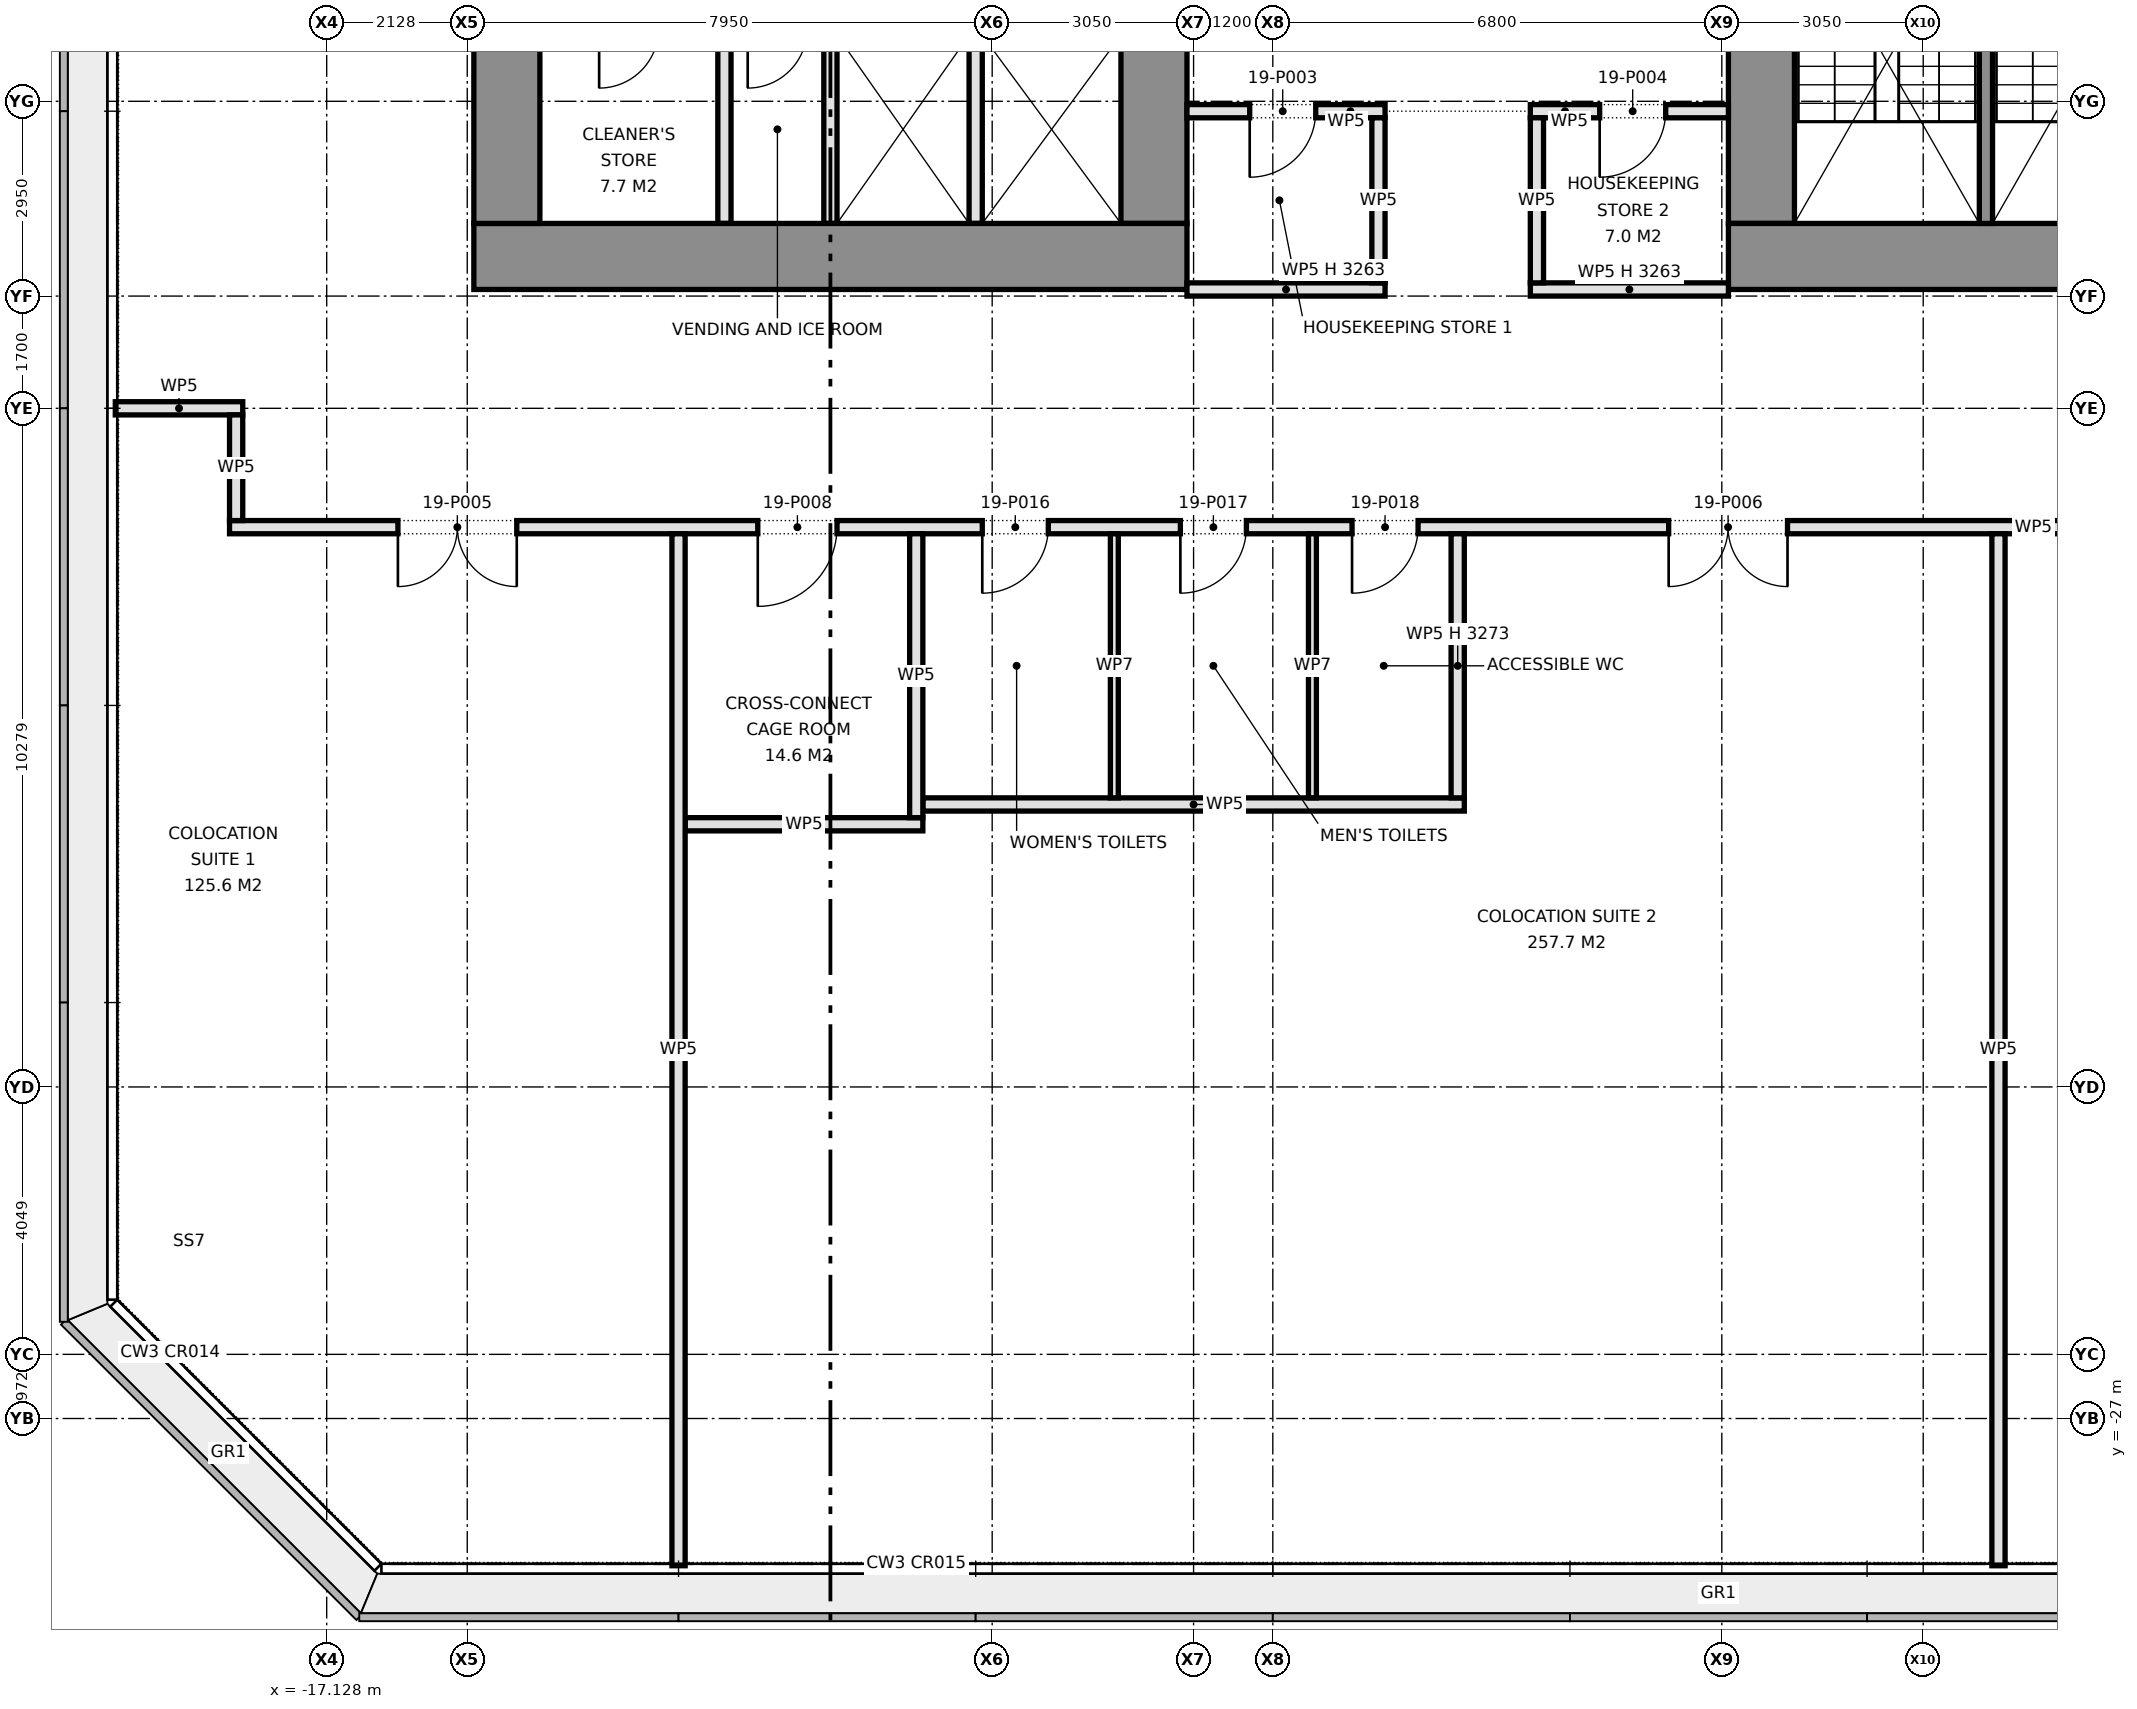
"""IFC4 building model, lengths in metres.
Left out: names, types, materials, properties, quantities, classifications, styles, units other than length and angle.
Written with IfcOpenShell. Run it as: python <this file> out.ifc"""

import sys

from ifc_helpers import new_model, si_unit, direction, frame, frame_2d, origin, place, context, subcontext, project, spatial, rectangle, extrude, element, fill, save


model = new_model("IFC4")
c1 = context("Model", 3, precision=1e-05, world=origin(), true_north=direction((0.0, 1.0)))
c2 = subcontext(c1, "Body", "Model", "MODEL_VIEW")
j1 = project(units=[si_unit("LENGTHUNIT", "METRE"), si_unit("PLANEANGLEUNIT", "RADIAN")], contexts=[c1])
p1 = place(None, origin())
s1 = spatial("IfcSite", under=j1, at=p1, CompositionType="ELEMENT")
p2 = place(p1, origin())
s2 = spatial("IfcBuilding", under=s1, at=p2, CompositionType="ELEMENT")
p3 = place(p2, frame((0.0, 0.0, 86.4)))
s3 = spatial("IfcBuildingStorey", under=s2, at=p3, CompositionType="ELEMENT", Elevation=86.4)
p4 = place(p3, frame((-14.9, -9.4, 0.0), z_axis=(0.0, 0.0, 1.0), x_axis=(1.0, 0.0, 0.0)))
e1 = element("IfcWall", 1, at=p4, inside=s3, PredefinedType="SHEAR", context=c2, shape_type="SweptSolid", body=[
    extrude(rectangle(XDim=10.8, YDim=1.0, at=frame_2d((5.4, 0.0))), origin(), (0.0, 0.0, 1.0), 4.2),
])
for number, where, z_axis, x_axis in (
    (2, (-14.4, -8.9, 0.0), (0.0, 0.0, 1.0), (0.0, 1.0, 0.0)),
    (3, (-4.6, -8.9, 0.0), (0.0, 0.0, 1.0), (0.0, 1.0, 0.0)),
):
    element("IfcWall", number, at=place(p3, frame(where, z_axis=z_axis, x_axis=x_axis)), inside=s3, PredefinedType="SHEAR", context=c2, shape_type="SweptSolid", body=[
        extrude(rectangle(XDim=3.15, YDim=1.0, at=frame_2d((1.575, 0.0))), origin(), (0.0, 0.0, 1.0), 4.2),
    ])
for number, where, z_axis, x_axis in (
    (4, (-9.5, -8.9, 0.0), (0.0, 0.0, 1.0), (0.0, 1.0, 0.0)),
    (5, (-7.3, -8.9, 0.0), (0.0, 0.0, 1.0), (0.0, 1.0, 0.0)),
    (6, (-11.105, -8.9, 0.0), (0.0, 0.0, 1.0), (0.0, 1.0, 0.0)),
):
    element("IfcWall", number, at=place(p3, frame(where, z_axis=z_axis, x_axis=x_axis)), inside=s3, PredefinedType="PARTITIONING", context=c2, shape_type="SweptSolid", body=[
        extrude(rectangle(XDim=2.85, YDim=0.2, at=frame_2d((1.425, 0.0))), origin(), (0.0, 0.0, 1.0), 4.2),
    ])
p5 = place(p3, frame((14.9, -9.4, 0.0), z_axis=(0.0, 0.0, 1.0), x_axis=(-1.0, 0.0, 0.0)))
e7 = element("IfcWall", 7, at=p5, inside=s3, PredefinedType="SHEAR", context=c2, shape_type="SweptSolid", body=[
    extrude(rectangle(XDim=10.8, YDim=1.0, at=frame_2d((5.4, 0.0))), origin(), (0.0, 0.0, 1.0), 4.2),
])
p6 = place(p3, frame((4.6, -1.55, 0.0), z_axis=(0.0, 0.0, 1.0), x_axis=(0.0, -1.0, 0.0)))
e8 = element("IfcWall", 8, at=p6, inside=s3, PredefinedType="SHEAR", context=c2, shape_type="SweptSolid", body=[
    extrude(rectangle(XDim=7.35, YDim=1.0, at=frame_2d((3.675, 0.0))), origin(), (0.0, 0.0, 1.0), 4.2),
])
p7 = place(p3, frame((8.0, -2.38, 0.0), z_axis=(0.0, 0.0, 1.0), x_axis=(0.0, -1.0, 0.0)))
e9 = element("IfcWall", 9, at=p7, inside=s3, PredefinedType="SHEAR", context=c2, shape_type="SweptSolid", body=[
    extrude(rectangle(XDim=6.52, YDim=0.2, at=frame_2d((3.26, 0.0))), origin(), (0.0, 0.0, 1.0), 4.2),
])
p8 = place(p3, frame((-11.7, -18.0, 0.0), z_axis=(0.0, 0.0, 1.0), x_axis=(1.0, 0.0, 0.0)))
e10 = element("IfcWall", 10, at=p8, inside=s3, PredefinedType="PARTITIONING", context=c2, shape_type="SweptSolid", body=[
    extrude(rectangle(XDim=3.6, YDim=0.2, at=frame_2d((1.8, 0.0))), origin(), (0.0, 0.0, 1.0), 4.2),
])
p9 = place(p3, frame((-8.1, -17.7, 0.0), z_axis=(0.0, 0.0, 1.0), x_axis=(1.0, 0.0, 0.0)))
e11 = element("IfcWall", 11, at=p9, inside=s3, PredefinedType="PARTITIONING", context=c2, shape_type="SweptSolid", body=[
    extrude(rectangle(XDim=8.2, YDim=0.2, at=frame_2d((4.1, 0.0))), origin(), (0.0, 0.0, 1.0), 4.2),
])
p10 = place(p3, frame((-18.6, -13.5, 0.0), z_axis=(0.0, 0.0, 1.0), x_axis=(1.0, 0.0, 0.0)))
e12 = element("IfcWall", 12, at=p10, inside=s3, PredefinedType="PARTITIONING", context=c2, shape_type="SweptSolid", body=[
    extrude(rectangle(XDim=37.2, YDim=0.2, at=frame_2d((18.6, 0.0))), origin(), (0.0, 0.0, 1.0), 4.2),
])
p11 = place(p10, frame((2.55, 0.0, 0.0)))
e13 = element("IfcOpeningElement", 13, at=p11, cuts=e12, PredefinedType="OPENING", context=c2, shape_type="SweptSolid", body=[
    extrude(rectangle(XDim=1.8, YDim=2.1, at=frame_2d((0.9, 1.05))), frame((0.0, 0.11, 0.0), z_axis=(0.0, -1.0, 0.0), x_axis=(1.0, 0.0, 0.0)), (0.0, 0.0, 1.0), 0.22),
])
p12 = place(p10, frame((21.795, 0.0, 0.0)))
e14 = element("IfcOpeningElement", 14, at=p12, cuts=e12, PredefinedType="OPENING", context=c2, shape_type="SweptSolid", body=[
    extrude(rectangle(XDim=1.8, YDim=2.1, at=frame_2d((0.9, 1.05))), frame((0.0, 0.11, 0.0), z_axis=(0.0, -1.0, 0.0), x_axis=(1.0, 0.0, 0.0)), (0.0, 0.0, 1.0), 0.22),
])
p13 = place(p10, frame((31.045, 0.0, 0.0)))
e15 = element("IfcOpeningElement", 15, at=p13, cuts=e12, PredefinedType="OPENING", context=c2, shape_type="SweptSolid", body=[
    extrude(rectangle(XDim=1.8, YDim=2.1, at=frame_2d((0.9, 1.05))), frame((0.0, 0.11, 0.0), z_axis=(0.0, -1.0, 0.0), x_axis=(1.0, 0.0, 0.0)), (0.0, 0.0, 1.0), 0.22),
])
p14 = place(p10, frame((8.0, 0.0, 0.0)))
e16 = element("IfcOpeningElement", 16, at=p14, cuts=e12, PredefinedType="OPENING", context=c2, shape_type="SweptSolid", body=[
    extrude(rectangle(XDim=1.2, YDim=2.1, at=frame_2d((0.6, 1.05))), frame((0.0, 0.11, 0.0), z_axis=(0.0, -1.0, 0.0), x_axis=(1.0, 0.0, 0.0)), (0.0, 0.0, 1.0), 0.22),
])
p15 = place(p10, frame((11.4, 0.0, 0.0)))
e17 = element("IfcOpeningElement", 17, at=p15, cuts=e12, PredefinedType="OPENING", context=c2, shape_type="SweptSolid", body=[
    extrude(rectangle(XDim=1.0, YDim=2.1, at=frame_2d((0.5, 1.05))), frame((0.0, 0.11, 0.0), z_axis=(0.0, -1.0, 0.0), x_axis=(1.0, 0.0, 0.0)), (0.0, 0.0, 1.0), 0.22),
])
p16 = place(p10, frame((14.4, 0.0, 0.0)))
e18 = element("IfcOpeningElement", 18, at=p16, cuts=e12, PredefinedType="OPENING", context=c2, shape_type="SweptSolid", body=[
    extrude(rectangle(XDim=1.0, YDim=2.1, at=frame_2d((0.5, 1.05))), frame((0.0, 0.11, 0.0), z_axis=(0.0, -1.0, 0.0), x_axis=(1.0, 0.0, 0.0)), (0.0, 0.0, 1.0), 0.22),
])
p17 = place(p10, frame((17.0, 0.0, 0.0)))
e19 = element("IfcOpeningElement", 19, at=p17, cuts=e12, PredefinedType="OPENING", context=c2, shape_type="SweptSolid", body=[
    extrude(rectangle(XDim=1.0, YDim=2.1, at=frame_2d((0.5, 1.05))), frame((0.0, 0.11, 0.0), z_axis=(0.0, -1.0, 0.0), x_axis=(1.0, 0.0, 0.0)), (0.0, 0.0, 1.0), 0.22),
])
p18 = place(p3, frame((-20.33, -11.7, 0.0), z_axis=(0.0, 0.0, 1.0), x_axis=(1.0, 0.0, 0.0)))
e20 = element("IfcWall", 20, at=p18, inside=s3, PredefinedType="PARTITIONING", context=c2, shape_type="SweptSolid", body=[
    extrude(rectangle(XDim=1.93, YDim=0.2, at=frame_2d((0.965, 0.0))), origin(), (0.0, 0.0, 1.0), 4.2),
])
for number, where, z_axis, x_axis in (
    (21, (-4.1, -9.9, 0.0), (0.0, 0.0, 1.0), (1.0, 0.0, 0.0)),
    (22, (1.1, -9.9, 0.0), (0.0, 0.0, 1.0), (1.0, 0.0, 0.0)),
):
    element("IfcWall", number, at=place(p3, frame(where, z_axis=z_axis, x_axis=x_axis)), inside=s3, PredefinedType="PARTITIONING", context=c2, shape_type="SweptSolid", body=[
        extrude(rectangle(XDim=3.0, YDim=0.2, at=frame_2d((1.5, 0.0))), origin(), (0.0, 0.0, 1.0), 3.263),
    ])
p19 = place(p3, frame((-4.1, -7.2, 0.0), z_axis=(0.0, 0.0, 1.0), x_axis=(1.0, 0.0, 0.0)))
e23 = element("IfcWall", 23, at=p19, inside=s3, PredefinedType="PARTITIONING", context=c2, shape_type="SweptSolid", body=[
    extrude(rectangle(XDim=3.0, YDim=0.2, at=frame_2d((1.5, 0.0))), origin(), (0.0, 0.0, 1.0), 4.2),
])
p20 = place(p19, frame((0.95, 0.0, 0.0)))
e24 = element("IfcOpeningElement", 24, at=p20, cuts=e23, PredefinedType="OPENING", context=c2, shape_type="SweptSolid", body=[
    extrude(rectangle(XDim=1.0, YDim=2.1, at=frame_2d((0.5, 1.05))), frame((0.0, 0.11, 0.0), z_axis=(0.0, -1.0, 0.0), x_axis=(1.0, 0.0, 0.0)), (0.0, 0.0, 1.0), 0.22),
])
p21 = place(p3, frame((1.1, -7.2, 0.0), z_axis=(0.0, 0.0, 1.0), x_axis=(1.0, 0.0, 0.0)))
e25 = element("IfcWall", 25, at=p21, inside=s3, PredefinedType="PARTITIONING", context=c2, shape_type="SweptSolid", body=[
    extrude(rectangle(XDim=3.0, YDim=0.2, at=frame_2d((1.5, 0.0))), origin(), (0.0, 0.0, 1.0), 4.2),
])
p22 = place(p21, frame((1.05, 0.0, 0.0)))
e26 = element("IfcOpeningElement", 26, at=p22, cuts=e25, PredefinedType="OPENING", context=c2, shape_type="SweptSolid", body=[
    extrude(rectangle(XDim=1.0, YDim=2.1, at=frame_2d((0.5, 1.05))), frame((0.0, 0.11, 0.0), z_axis=(0.0, -1.0, 0.0), x_axis=(1.0, 0.0, 0.0)), (0.0, 0.0, 1.0), 0.22),
])
p23 = place(p3, frame((8.19, -29.23, 0.0), z_axis=(0.0, 0.0, 1.0), x_axis=(0.0, 1.0, 0.0)))
e27 = element("IfcWall", 27, at=p23, inside=s3, PredefinedType="PARTITIONING", context=c2, shape_type="SweptSolid", body=[
    extrude(rectangle(XDim=15.63, YDim=0.2, at=frame_2d((7.815, 0.0))), origin(), (0.0, 0.0, 1.0), 4.2),
])
p24 = place(p3, frame((1.2, -9.8, 0.0), z_axis=(0.0, 0.0, 1.0), x_axis=(0.0, 1.0, 0.0)))
e28 = element("IfcWall", 28, at=p24, inside=s3, PredefinedType="PARTITIONING", context=c2, shape_type="SweptSolid", body=[
    extrude(rectangle(XDim=2.5, YDim=0.2, at=frame_2d((1.25, 0.0))), origin(), (0.0, 0.0, 1.0), 4.2),
])
p25 = place(p3, frame((0.0, -17.6, 0.0), z_axis=(0.0, 0.0, 1.0), x_axis=(0.0, 1.0, 0.0)))
e29 = element("IfcWall", 29, at=p25, inside=s3, PredefinedType="PARTITIONING", context=c2, shape_type="SweptSolid", body=[
    extrude(rectangle(XDim=4.0, YDim=0.2, at=frame_2d((2.0, 0.0))), origin(), (0.0, 0.0, 1.0), 3.273),
])
p26 = place(p3, frame((-1.2, -9.8, 0.0), z_axis=(0.0, 0.0, 1.0), x_axis=(0.0, 1.0, 0.0)))
e30 = element("IfcWall", 30, at=p26, inside=s3, PredefinedType="PARTITIONING", context=c2, shape_type="SweptSolid", body=[
    extrude(rectangle(XDim=2.5, YDim=0.2, at=frame_2d((1.25, 0.0))), origin(), (0.0, 0.0, 1.0), 4.2),
])
p27 = place(p3, frame((-8.2, -17.9, 0.0), z_axis=(0.0, 0.0, 1.0), x_axis=(0.0, 1.0, 0.0)))
e31 = element("IfcWall", 31, at=p27, inside=s3, PredefinedType="PARTITIONING", context=c2, shape_type="SweptSolid", body=[
    extrude(rectangle(XDim=4.3, YDim=0.2, at=frame_2d((2.15, 0.0))), origin(), (0.0, 0.0, 1.0), 4.2),
])
p28 = place(p3, frame((-11.8, -29.23, 0.0), z_axis=(0.0, 0.0, 1.0), x_axis=(0.0, 1.0, 0.0)))
e32 = element("IfcWall", 32, at=p28, inside=s3, PredefinedType="PARTITIONING", context=c2, shape_type="SweptSolid", body=[
    extrude(rectangle(XDim=15.63, YDim=0.2, at=frame_2d((7.815, 0.0))), origin(), (0.0, 0.0, 1.0), 4.2),
])
p29 = place(p3, frame((-18.5, -13.4, 0.0), z_axis=(0.0, 0.0, 1.0), x_axis=(0.0, 1.0, 0.0)))
e33 = element("IfcWall", 33, at=p29, inside=s3, PredefinedType="PARTITIONING", context=c2, shape_type="SweptSolid", body=[
    extrude(rectangle(XDim=1.6, YDim=0.2, at=frame_2d((0.8, 0.0))), origin(), (0.0, 0.0, 1.0), 4.2),
])
for number, where, z_axis, x_axis in (
    (34, (-2.2, -17.6, 0.0), (0.0, 0.0, 1.0), (0.0, 1.0, 0.0)),
    (35, (-5.2, -17.6, 0.0), (0.0, 0.0, 1.0), (0.0, 1.0, 0.0)),
):
    element("IfcWall", number, at=place(p3, frame(where, z_axis=z_axis, x_axis=x_axis)), inside=s3, PredefinedType="PARTITIONING", context=c2, shape_type="SweptSolid", body=[
        extrude(rectangle(XDim=4.0, YDim=0.12, at=frame_2d((2.0, 0.0))), origin(), (0.0, 0.0, 1.0), 4.2),
    ])
p30 = place(p20, frame((1.0, 0.0, 0.0), z_axis=(0.0, 0.0, 1.0), x_axis=(-1.0, 0.0, 0.0)))
e36 = element("IfcDoor", 36, at=p30, inside=s3, OperationType="SINGLE_SWING_RIGHT", PredefinedType="DOOR", context=c2, shape_type="SweptSolid", body=[
    extrude(rectangle(XDim=1.0, YDim=2.1, at=frame_2d((0.5, 1.05))), frame((0.0, 0.025, 0.0), z_axis=(0.0, -1.0, 0.0), x_axis=(1.0, 0.0, 0.0)), (0.0, 0.0, 1.0), 0.05),
])
fill(e24, e36)
p31 = place(p22, frame((1.0, 0.0, 0.0), z_axis=(0.0, 0.0, 1.0), x_axis=(-1.0, 0.0, 0.0)))
e37 = element("IfcDoor", 37, at=p31, inside=s3, OperationType="SINGLE_SWING_RIGHT", PredefinedType="DOOR", context=c2, shape_type="SweptSolid", body=[
    extrude(rectangle(XDim=1.0, YDim=2.1, at=frame_2d((0.5, 1.05))), frame((0.0, 0.025, 0.0), z_axis=(0.0, -1.0, 0.0), x_axis=(1.0, 0.0, 0.0)), (0.0, 0.0, 1.0), 0.05),
])
fill(e26, e37)
p32 = place(p11, frame((1.8, 0.0, 0.0), z_axis=(0.0, 0.0, 1.0), x_axis=(-1.0, 0.0, 0.0)))
e38 = element("IfcDoor", 38, at=p32, inside=s3, OperationType="DOUBLE_DOOR_SINGLE_SWING", PredefinedType="DOOR", context=c2, shape_type="SweptSolid", body=[
    extrude(rectangle(XDim=1.8, YDim=2.1, at=frame_2d((0.9, 1.05))), frame((0.0, 0.025, 0.0), z_axis=(0.0, -1.0, 0.0), x_axis=(1.0, 0.0, 0.0)), (0.0, 0.0, 1.0), 0.05),
])
fill(e13, e38)
p33 = place(p12, frame((1.8, 0.0, 0.0), z_axis=(0.0, 0.0, 1.0), x_axis=(-1.0, 0.0, 0.0)))
e39 = element("IfcDoor", 39, at=p33, inside=s3, OperationType="DOUBLE_DOOR_SINGLE_SWING", PredefinedType="DOOR", context=c2, shape_type="SweptSolid", body=[
    extrude(rectangle(XDim=1.8, YDim=2.1, at=frame_2d((0.9, 1.05))), frame((0.0, 0.025, 0.0), z_axis=(0.0, -1.0, 0.0), x_axis=(1.0, 0.0, 0.0)), (0.0, 0.0, 1.0), 0.05),
])
fill(e14, e39)
p34 = place(p14, frame((1.2, 0.0, 0.0), z_axis=(0.0, 0.0, 1.0), x_axis=(-1.0, 0.0, 0.0)))
e40 = element("IfcDoor", 40, at=p34, inside=s3, OperationType="SINGLE_SWING_RIGHT", PredefinedType="DOOR", context=c2, shape_type="SweptSolid", body=[
    extrude(rectangle(XDim=1.2, YDim=2.1, at=frame_2d((0.6, 1.05))), frame((0.0, 0.025, 0.0), z_axis=(0.0, -1.0, 0.0), x_axis=(1.0, 0.0, 0.0)), (0.0, 0.0, 1.0), 0.05),
])
fill(e16, e40)
p35 = place(p15, frame((1.0, 0.0, 0.0), z_axis=(0.0, 0.0, 1.0), x_axis=(-1.0, 0.0, 0.0)))
e41 = element("IfcDoor", 41, at=p35, inside=s3, OperationType="SINGLE_SWING_RIGHT", PredefinedType="DOOR", context=c2, shape_type="SweptSolid", body=[
    extrude(rectangle(XDim=1.0, YDim=2.1, at=frame_2d((0.5, 1.05))), frame((0.0, 0.025, 0.0), z_axis=(0.0, -1.0, 0.0), x_axis=(1.0, 0.0, 0.0)), (0.0, 0.0, 1.0), 0.05),
])
fill(e17, e41)
p36 = place(p16, frame((1.0, 0.0, 0.0), z_axis=(0.0, 0.0, 1.0), x_axis=(-1.0, 0.0, 0.0)))
e42 = element("IfcDoor", 42, at=p36, inside=s3, OperationType="SINGLE_SWING_RIGHT", PredefinedType="DOOR", context=c2, shape_type="SweptSolid", body=[
    extrude(rectangle(XDim=1.0, YDim=2.1, at=frame_2d((0.5, 1.05))), frame((0.0, 0.025, 0.0), z_axis=(0.0, -1.0, 0.0), x_axis=(1.0, 0.0, 0.0)), (0.0, 0.0, 1.0), 0.05),
])
fill(e18, e42)
p37 = place(p17, frame((1.0, 0.0, 0.0), z_axis=(0.0, 0.0, 1.0), x_axis=(-1.0, 0.0, 0.0)))
e43 = element("IfcDoor", 43, at=p37, inside=s3, OperationType="SINGLE_SWING_RIGHT", PredefinedType="DOOR", context=c2, shape_type="SweptSolid", body=[
    extrude(rectangle(XDim=1.0, YDim=2.1, at=frame_2d((0.5, 1.05))), frame((0.0, 0.025, 0.0), z_axis=(0.0, -1.0, 0.0), x_axis=(1.0, 0.0, 0.0)), (0.0, 0.0, 1.0), 0.05),
])
fill(e19, e43)
save(model, sys.argv[1])
